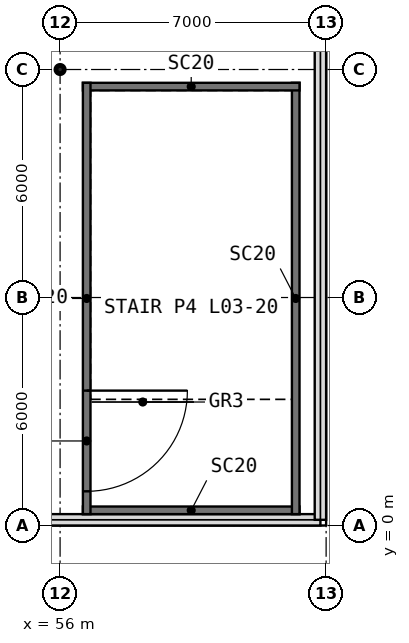
"""IFC4 building model, lengths in metres.
Left out: names, types, materials, properties, quantities, classifications, styles, units other than length and angle.
Written with IfcOpenShell. Run it as: python <this file> out.ifc"""

import sys

from ifc_helpers import new_model, si_unit, direction, frame, frame_2d, origin, origin_2d, place, context, subcontext, project, spatial, rectangle, hollow_circle, extrude, element, fill, save


model = new_model("IFC4")
c1 = context("Model", 3, precision=1e-05, world=origin(), true_north=direction((0.0, 1.0)))
c2 = subcontext(c1, "Body", "Model", "MODEL_VIEW")
j1 = project(units=[si_unit("LENGTHUNIT", "METRE"), si_unit("PLANEANGLEUNIT", "RADIAN")], contexts=[c1])
p1 = place(None, origin())
s1 = spatial("IfcSite", under=j1, at=p1, CompositionType="ELEMENT")
p2 = place(p1, origin())
s2 = spatial("IfcBuilding", under=s1, at=p2, CompositionType="ELEMENT")
p3 = place(p2, frame((0.0, 0.0, 18.0)))
s3 = spatial("IfcBuildingStorey", under=s2, at=p3, CompositionType="ELEMENT", Elevation=18.0)
p4 = place(p3, frame((42.0, 0.15, 0.0), z_axis=(0.0, 0.0, 1.0), x_axis=(1.0, 0.0, 0.0)))
e1 = element("IfcWall", 1, at=p4, inside=s3, PredefinedType="PARAPET", context=c2, shape_type="SweptSolid", body=[
    extrude(rectangle(XDim=20.85, YDim=0.3, at=frame_2d((10.425, 0.0))), origin(), (0.0, 0.0, 1.0), 0.25),
])
p5 = place(p3, frame((62.85, 0.15, 0.0), z_axis=(0.0, 0.0, 1.0), x_axis=(0.0, 1.0, 0.0)))
e2 = element("IfcWall", 2, at=p5, inside=s3, PredefinedType="PARAPET", context=c2, shape_type="SweptSolid", body=[
    extrude(rectangle(XDim=41.7, YDim=0.3, at=frame_2d((20.85, 0.0))), origin(), (0.0, 0.0, 1.0), 0.25),
])
p6 = place(p3, frame((56.0, 12.0, 0.0), z_axis=(0.0, 0.0, 1.0), x_axis=(1.0, 0.0, 0.0)))
e3 = element("IfcColumn", 3, at=p6, inside=s3, PredefinedType="COLUMN", context=c2, shape_type="SweptSolid", body=[
    extrude(hollow_circle(Radius=0.11, WallThickness=0.008, at=origin_2d()), origin(), (0.0, 0.0, 1.0), 3.0),
])
p7 = place(p3, frame((56.6, 0.4, -0.2), z_axis=(0.0, 0.0, 1.0), x_axis=(1.0, 0.0, 0.0)))
e4 = element("IfcWall", 4, at=p7, inside=s3, PredefinedType="SOLIDWALL", context=c2, shape_type="SweptSolid", body=[
    extrude(rectangle(XDim=5.7, YDim=0.2, at=frame_2d((2.85, 0.0))), origin(), (0.0, 0.0, 1.0), 4.65),
])
p8 = place(p3, frame((62.2, 0.3, -0.2), z_axis=(0.0, 0.0, 1.0), x_axis=(0.0, 1.0, 0.0)))
e5 = element("IfcWall", 5, at=p8, inside=s3, PredefinedType="SOLIDWALL", context=c2, shape_type="SweptSolid", body=[
    extrude(rectangle(XDim=11.35, YDim=0.2, at=frame_2d((5.675, 0.0))), origin(), (0.0, 0.0, 1.0), 4.65),
])
p9 = place(p3, frame((62.3, 11.55, -0.2), z_axis=(0.0, 0.0, 1.0), x_axis=(-1.0, 0.0, 0.0)))
e6 = element("IfcWall", 6, at=p9, inside=s3, PredefinedType="SOLIDWALL", context=c2, shape_type="SweptSolid", body=[
    extrude(rectangle(XDim=5.7, YDim=0.2, at=frame_2d((2.85, 0.0))), origin(), (0.0, 0.0, 1.0), 4.65),
])
p10 = place(p3, frame((56.7, 11.65, -0.2), z_axis=(0.0, 0.0, 1.0), x_axis=(0.0, -1.0, 0.0)))
e7 = element("IfcWall", 7, at=p10, inside=s3, PredefinedType="SOLIDWALL", context=c2, shape_type="SweptSolid", body=[
    extrude(rectangle(XDim=11.35, YDim=0.2, at=frame_2d((5.675, 0.0))), origin(), (0.0, 0.0, 1.0), 4.65),
])
p11 = place(p10, frame((8.1, 0.0, 0.2)))
e8 = element("IfcOpeningElement", 8, at=p11, cuts=e7, PredefinedType="OPENING", context=c2, shape_type="SweptSolid", body=[
    extrude(rectangle(XDim=2.65, YDim=2.4, at=frame_2d((1.325, 1.2))), frame((0.0, 0.11, 0.0), z_axis=(0.0, -1.0, 0.0), x_axis=(1.0, 0.0, 0.0)), (0.0, 0.0, 1.0), 0.22),
])
p12 = place(p11, origin())
e9 = element("IfcDoor", 9, at=p12, inside=s3, OperationType="DOUBLE_DOOR_SINGLE_SWING", PredefinedType="DOOR", context=c2, shape_type="SweptSolid", body=[
    extrude(rectangle(XDim=2.65, YDim=2.4, at=frame_2d((1.325, 1.2))), frame((0.0, 0.025, 0.0), z_axis=(0.0, -1.0, 0.0), x_axis=(1.0, 0.0, 0.0)), (0.0, 0.0, 1.0), 0.05),
])
fill(e8, e9)
save(model, sys.argv[1])
